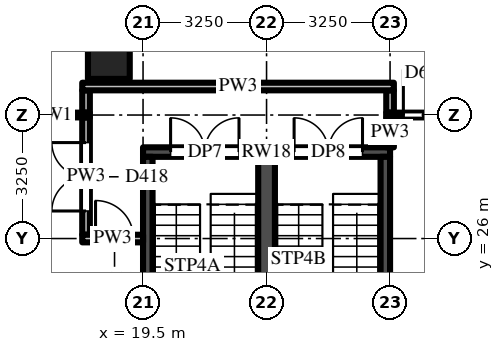
"""IFC4 building model, lengths in metres.
Left out: names, types, materials, properties, quantities, classifications, styles, units other than length and angle.
Written with IfcOpenShell. Run it as: python <this file> out.ifc"""

import sys

from ifc_helpers import new_model, si_unit, direction, frame, frame_2d, origin, origin_2d, place, context, subcontext, project, spatial, rectangle, extrude, source, transform, mapped, element, fill, save


model = new_model("IFC4")
c1 = context("Model", 3, precision=1e-05, world=origin(), true_north=direction((0.0, 1.0)))
c2 = subcontext(c1, "Body", "Model", "MODEL_VIEW")
j1 = project(units=[si_unit("LENGTHUNIT", "METRE"), si_unit("PLANEANGLEUNIT", "RADIAN")], contexts=[c1])
p1 = place(None, origin())
s1 = spatial("IfcSite", under=j1, at=p1, CompositionType="ELEMENT")
p2 = place(p1, origin())
s2 = spatial("IfcBuilding", under=s1, at=p2, CompositionType="ELEMENT")
p3 = place(p2, frame((0.0, 0.0, 14.0)))
s3 = spatial("IfcBuildingStorey", under=s2, at=p3, CompositionType="ELEMENT", Elevation=14.0)
m1 = source(origin(), c2, "Body", "SweptSolid", [
    extrude(rectangle(XDim=1.1, YDim=1.1, at=origin_2d()), origin(), (0.0, 0.0, 1.0), 5.0),
])
p4 = place(p3, frame((18.6, 30.75, 0.0), z_axis=(0.0, 0.0, 1.0), x_axis=(1.0, 0.0, 0.0)))
e1 = element("IfcColumn", 1, at=p4, inside=s3, PredefinedType="COLUMN", context=c2, shape_type="MappedRepresentation", body=[
    mapped(m1, transform((0.0, 0.0, 0.0))),
])
m2 = source(origin(), c2, "Body", "SweptSolid", [
    extrude(rectangle(XDim=6.5, YDim=0.25, at=frame_2d((3.25, 0.0))), origin(), (0.0, 0.0, 1.0), 4.7),
])
p5 = place(p3, frame((19.5, 28.275, 0.0), z_axis=(0.0, 0.0, 1.0), x_axis=(1.0, 0.0, 0.0)))
e2 = element("IfcWall", 2, at=p5, inside=s3, PredefinedType="SHEAR", context=c2, shape_type="MappedRepresentation", body=[
    mapped(m2, transform((0.0, 0.0, 0.0))),
])
m3 = source(origin(), c2, "Body", "SweptSolid", [
    extrude(rectangle(XDim=1.8, YDim=2.1, at=frame_2d((0.9, 1.05))), frame((0.0, 0.135, 0.0), z_axis=(0.0, -1.0, 0.0), x_axis=(1.0, 0.0, 0.0)), (0.0, 0.0, 1.0), 0.27),
])
p6 = place(p5, frame((0.725, 0.0, 0.0)))
e3 = element("IfcOpeningElement", 3, at=p6, cuts=e2, PredefinedType="OPENING", context=c2, shape_type="MappedRepresentation", body=[
    mapped(m3, transform((0.0, 0.0, 0.0))),
])
p7 = place(p5, frame((3.975, 0.0, 0.0)))
e4 = element("IfcOpeningElement", 4, at=p7, cuts=e2, PredefinedType="OPENING", context=c2, shape_type="MappedRepresentation", body=[
    mapped(m3, transform((0.0, 0.0, 0.0))),
])
m4 = source(origin(), c2, "Body", "SweptSolid", [
    extrude(rectangle(XDim=8.3, YDim=0.25, at=frame_2d((4.15, 0.0))), origin(), (0.0, 0.0, 1.0), 4.7),
])
for number, where, z_axis, x_axis in (
    (5, (19.625, 19.85, 0.0), (0.0, 0.0, 1.0), (0.0, 1.0, 0.0)),
    (6, (25.875, 19.85, 0.0), (0.0, 0.0, 1.0), (0.0, 1.0, 0.0)),
):
    element("IfcWall", number, at=place(p3, frame(where, z_axis=z_axis, x_axis=x_axis)), inside=s3, PredefinedType="SHEAR", context=c2, shape_type="MappedRepresentation", body=[
        mapped(m4, transform((0.0, 0.0, 0.0))),
    ])
m5 = source(origin(), c2, "Body", "SweptSolid", [
    extrude(rectangle(XDim=8.3, YDim=0.44, at=frame_2d((4.15, 0.0))), origin(), (0.0, 0.0, 1.0), 4.7),
])
p8 = place(p3, frame((22.75, 19.85, 0.0), z_axis=(0.0, 0.0, 1.0), x_axis=(0.0, 1.0, 0.0)))
e7 = element("IfcWall", 7, at=p8, inside=s3, PredefinedType="SHEAR", context=c2, shape_type="MappedRepresentation", body=[
    mapped(m5, transform((0.0, 0.0, 0.0))),
])
m6 = source(origin(), c2, "Body", "SweptSolid", [
    extrude(rectangle(XDim=3.087, YDim=0.2, at=frame_2d((1.544, 0.0))), origin(), (0.0, 0.0, 1.0), 4.274),
])
p9 = place(p3, frame((18.0, 26.1, 0.0), z_axis=(0.0, 0.0, 1.0), x_axis=(0.0, 1.0, 0.0)))
e8 = element("IfcWall", 8, at=p9, inside=s3, PredefinedType="PARTITIONING", context=c2, shape_type="MappedRepresentation", body=[
    mapped(m6, transform((0.0, 0.0, 0.0))),
])
m7 = source(origin(), c2, "Body", "SweptSolid", [
    extrude(rectangle(XDim=1.8, YDim=2.1, at=frame_2d((0.9, 1.05))), frame((0.0, 0.11, 0.0), z_axis=(0.0, -1.0, 0.0), x_axis=(1.0, 0.0, 0.0)), (0.0, 0.0, 1.0), 0.22),
])
p10 = place(p9, frame((0.625, 0.0, 0.0)))
e9 = element("IfcOpeningElement", 9, at=p10, cuts=e8, PredefinedType="OPENING", context=c2, shape_type="MappedRepresentation", body=[
    mapped(m7, transform((0.0, 0.0, 0.0))),
])
m8 = source(origin(), c2, "Body", "SweptSolid", [
    extrude(rectangle(XDim=0.587, YDim=0.2, at=frame_2d((0.294, 0.0))), origin(), (0.0, 0.0, 1.0), 4.7),
])
p11 = place(p3, frame((18.0, 29.9, 0.0), z_axis=(0.0, 0.0, 1.0), x_axis=(0.0, -1.0, 0.0)))
e10 = element("IfcWall", 10, at=p11, inside=s3, PredefinedType="PARTITIONING", context=c2, shape_type="MappedRepresentation", body=[
    mapped(m8, transform((0.0, 0.0, 0.0))),
])
m9 = source(origin(), c2, "Body", "SweptSolid", [
    extrude(rectangle(XDim=0.788, YDim=0.2, at=frame_2d((0.394, 0.0))), origin(), (0.0, 0.0, 1.0), 4.7),
])
p12 = place(p3, frame((26.0, 28.4, 0.0), z_axis=(0.0, 0.0, 1.0), x_axis=(0.0, 1.0, 0.0)))
e11 = element("IfcWall", 11, at=p12, inside=s3, PredefinedType="PARTITIONING", context=c2, shape_type="MappedRepresentation", body=[
    mapped(m9, transform((0.0, 0.0, 0.0))),
])
p13 = place(p3, frame((26.0, 29.9, 0.0), z_axis=(0.0, 0.0, 1.0), x_axis=(0.0, -1.0, 0.0)))
e12 = element("IfcWall", 12, at=p13, inside=s3, PredefinedType="PARTITIONING", context=c2, shape_type="MappedRepresentation", body=[
    mapped(m8, transform((0.0, 0.0, 0.0))),
])
m10 = source(origin(), c2, "Body", "SweptSolid", [
    extrude(rectangle(XDim=1.6, YDim=0.2, at=frame_2d((0.8, 0.0))), origin(), (0.0, 0.0, 1.0), 3.762),
])
p14 = place(p3, frame((17.9, 26.0, 0.0), z_axis=(0.0, 0.0, 1.0), x_axis=(1.0, 0.0, 0.0)))
e13 = element("IfcWall", 13, at=p14, inside=s3, PredefinedType="PARTITIONING", context=c2, shape_type="MappedRepresentation", body=[
    mapped(m10, transform((0.0, 0.0, 0.0))),
])
m11 = source(origin(), c2, "Body", "SweptSolid", [
    extrude(rectangle(XDim=1.0, YDim=2.1, at=frame_2d((0.5, 1.05))), frame((0.0, 0.11, 0.0), z_axis=(0.0, -1.0, 0.0), x_axis=(1.0, 0.0, 0.0)), (0.0, 0.0, 1.0), 0.22),
])
p15 = place(p14, frame((0.35, 0.0, 0.0)))
e14 = element("IfcOpeningElement", 14, at=p15, cuts=e13, PredefinedType="OPENING", context=c2, shape_type="MappedRepresentation", body=[
    mapped(m11, transform((0.0, 0.0, 0.0))),
])
m12 = source(origin(), c2, "Body", "SweptSolid", [
    extrude(rectangle(XDim=1.95, YDim=0.125, at=frame_2d((0.975, 0.0))), origin(), (0.0, 0.0, 1.0), 4.7),
])
p16 = place(p3, frame((16.15, 29.25, 0.0), z_axis=(0.0, 0.0, 1.0), x_axis=(1.0, 0.0, 0.0)))
e15 = element("IfcWall", 15, at=p16, inside=s3, PredefinedType="PARTITIONING", context=c2, shape_type="MappedRepresentation", body=[
    mapped(m12, transform((0.0, 0.0, 0.0))),
])
m13 = source(origin(), c2, "Body", "SweptSolid", [
    extrude(rectangle(XDim=3.413, YDim=0.125, at=frame_2d((1.706, 0.0))), origin(), (0.0, 0.0, 1.0), 4.7),
])
p17 = place(p3, frame((25.9, 29.25, 0.0), z_axis=(0.0, 0.0, 1.0), x_axis=(1.0, 0.0, 0.0)))
e16 = element("IfcWall", 16, at=p17, inside=s3, PredefinedType="PARTITIONING", context=c2, shape_type="MappedRepresentation", body=[
    mapped(m13, transform((0.0, 0.0, 0.0))),
])
m14 = source(origin(), c2, "Body", "SweptSolid", [
    extrude(rectangle(XDim=1.2, YDim=2.1, at=frame_2d((0.6, 1.05))), frame((0.0, 0.073, 0.0), z_axis=(0.0, -1.0, 0.0), x_axis=(1.0, 0.0, 0.0)), (0.0, 0.0, 1.0), 0.145),
])
p18 = place(p17, frame((0.45, 0.0, 0.0)))
e17 = element("IfcOpeningElement", 17, at=p18, cuts=e16, PredefinedType="OPENING", context=c2, shape_type="MappedRepresentation", body=[
    mapped(m14, transform((0.0, 0.0, 0.0))),
])
m15 = source(origin(), c2, "Body", "SweptSolid", [
    extrude(rectangle(XDim=8.2, YDim=0.2, at=frame_2d((4.1, 0.0))), origin(), (0.0, 0.0, 1.0), 3.762),
])
p19 = place(p3, frame((17.9, 30.0, 0.0), z_axis=(0.0, 0.0, 1.0), x_axis=(1.0, 0.0, 0.0)))
e18 = element("IfcWall", 18, at=p19, inside=s3, PredefinedType="PARTITIONING", context=c2, shape_type="MappedRepresentation", body=[
    mapped(m15, transform((0.0, 0.0, 0.0))),
])
m16 = source(origin(), c2, "Body", "SweptSolid", [
    extrude(rectangle(XDim=1.8, YDim=2.1, at=frame_2d((0.9, 1.05))), frame((0.0, 0.025, 0.0), z_axis=(0.0, -1.0, 0.0), x_axis=(1.0, 0.0, 0.0)), (0.0, 0.0, 1.0), 0.05),
])
p20 = place(p6, origin())
e19 = element("IfcDoor", 19, at=p20, inside=s3, OperationType="DOUBLE_DOOR_SINGLE_SWING", PredefinedType="DOOR", context=c2, shape_type="MappedRepresentation", body=[
    mapped(m16, transform((0.0, 0.0, 0.0))),
])
fill(e3, e19)
p21 = place(p7, origin())
e20 = element("IfcDoor", 20, at=p21, inside=s3, OperationType="DOUBLE_DOOR_SINGLE_SWING", PredefinedType="DOOR", context=c2, shape_type="MappedRepresentation", body=[
    mapped(m16, transform((0.0, 0.0, 0.0))),
])
fill(e4, e20)
m17 = source(origin(), c2, "Body", "SweptSolid", [
    extrude(rectangle(XDim=1.0, YDim=2.1, at=frame_2d((0.5, 1.05))), frame((0.0, 0.025, 0.0), z_axis=(0.0, -1.0, 0.0), x_axis=(1.0, 0.0, 0.0)), (0.0, 0.0, 1.0), 0.05),
])
p22 = place(p15, origin())
e21 = element("IfcDoor", 21, at=p22, inside=s3, OperationType="SINGLE_SWING_LEFT", PredefinedType="DOOR", context=c2, shape_type="MappedRepresentation", body=[
    mapped(m17, transform((0.0, 0.0, 0.0))),
])
fill(e14, e21)
p23 = place(p10, origin())
e22 = element("IfcDoor", 22, at=p23, inside=s3, OperationType="DOUBLE_DOOR_SINGLE_SWING", PredefinedType="DOOR", context=c2, shape_type="MappedRepresentation", body=[
    mapped(m16, transform((0.0, 0.0, 0.0))),
])
fill(e9, e22)
m18 = source(origin(), c2, "Body", "SweptSolid", [
    extrude(rectangle(XDim=1.2, YDim=2.1, at=frame_2d((0.6, 1.05))), frame((0.0, 0.025, 0.0), z_axis=(0.0, -1.0, 0.0), x_axis=(1.0, 0.0, 0.0)), (0.0, 0.0, 1.0), 0.05),
])
p24 = place(p18, origin())
e23 = element("IfcDoor", 23, at=p24, inside=s3, OperationType="SINGLE_SWING_LEFT", PredefinedType="DOOR", context=c2, shape_type="MappedRepresentation", body=[
    mapped(m18, transform((0.0, 0.0, 0.0))),
])
fill(e17, e23)
save(model, sys.argv[1])
